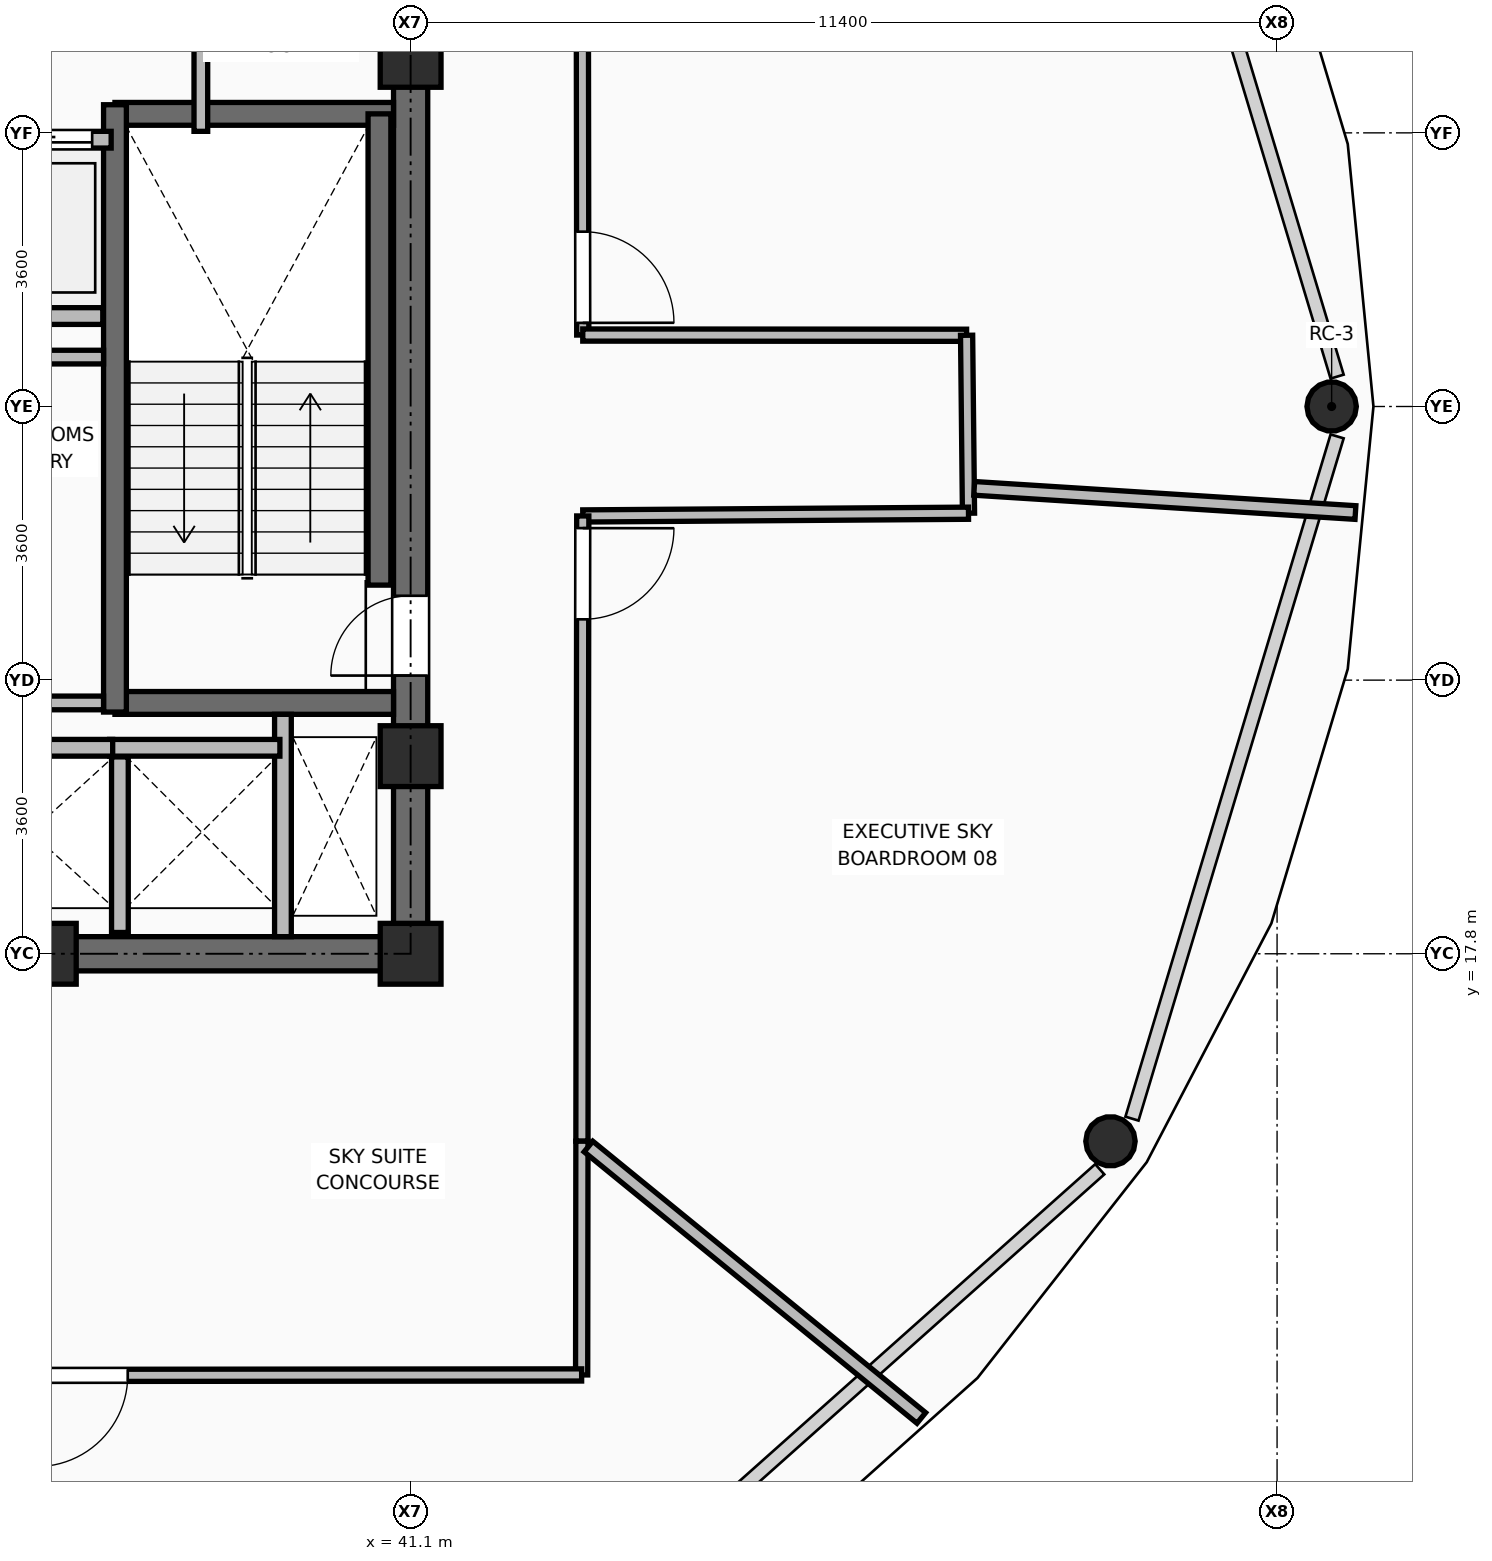
"""IFC4 building model, lengths in metres.
Left out: names, types, materials, properties, quantities, classifications, styles, units other than length and angle.
Written with IfcOpenShell. Run it as: python <this file> out.ifc"""

import sys

from ifc_helpers import new_model, si_unit, direction, frame, frame_2d, origin, origin_2d, place, context, subcontext, project, spatial, rectangle, hollow_circle, extrude, element, fill, save


model = new_model("IFC4")
c1 = context("Model", 3, precision=1e-05, world=origin(), true_north=direction((0.0, 1.0)))
c2 = subcontext(c1, "Body", "Model", "MODEL_VIEW")
j1 = project(units=[si_unit("LENGTHUNIT", "METRE"), si_unit("PLANEANGLEUNIT", "RADIAN")], contexts=[c1])
p1 = place(None, origin())
s1 = spatial("IfcSite", under=j1, at=p1, CompositionType="ELEMENT")
p2 = place(p1, origin())
s2 = spatial("IfcBuilding", under=s1, at=p2, CompositionType="ELEMENT")
p3 = place(p2, frame((0.0, 0.0, 246.15)))
s3 = spatial("IfcBuildingStorey", under=s2, at=p3, CompositionType="ELEMENT", Elevation=246.15)
for number, where, z_axis, x_axis in (
    (1, (36.3, 17.8, 0.0), (0.0, 0.0, 1.0), (1.0, 0.0, 0.0)),
    (2, (41.1, 17.8, 0.0), (0.0, 0.0, 1.0), (1.0, 0.0, 0.0)),
    (3, (41.1, 20.4, 0.0), (0.0, 0.0, 1.0), (1.0, 0.0, 0.0)),
    (4, (41.1, 29.6, 0.0), (0.0, 0.0, 1.0), (1.0, 0.0, 0.0)),
):
    element("IfcColumn", number, at=place(p3, frame(where, z_axis=z_axis, x_axis=x_axis)), inside=s3, PredefinedType="COLUMN", context=c2, shape_type="SweptSolid", body=[
        extrude(rectangle(XDim=0.8, YDim=0.8, at=origin_2d()), origin(), (0.0, 0.0, 1.0), 3.75),
    ])
for number, where, z_axis, x_axis in (
    (5, (53.218, 25.0, 0.0), (0.0, 0.0, 1.0), (1.0, 0.0, 0.0)),
    (6, (50.308, 15.333, 0.0), (0.0, 0.0, 1.0), (1.0, 0.0, 0.0)),
):
    element("IfcColumn", number, at=place(p3, frame(where, z_axis=z_axis, x_axis=x_axis)), inside=s3, PredefinedType="COLUMN", context=c2, shape_type="SweptSolid", body=[
        extrude(hollow_circle(Radius=0.325, WallThickness=0.03, at=origin_2d()), origin(), (0.0, 0.0, 1.0), 3.57),
    ])
p4 = place(p3, frame((37.275, 18.08, 0.0), z_axis=(0.0, 0.0, 1.0), x_axis=(0.0, 1.0, 0.0)))
e7 = element("IfcWall", 7, at=p4, inside=s3, PredefinedType="PARTITIONING", context=c2, shape_type="SweptSolid", body=[
    extrude(rectangle(XDim=2.31, YDim=0.22, at=frame_2d((1.155, 0.0))), origin(), (0.0, 0.0, 1.0), 3.545),
])
p5 = place(p3, frame((34.91, 26.19, 0.0), z_axis=(0.0, 0.0, 1.0), x_axis=(1.0, 0.0, 0.0)))
e8 = element("IfcWall", 8, at=p5, inside=s3, PredefinedType="PARTITIONING", context=c2, shape_type="SweptSolid", body=[
    extrude(rectangle(XDim=2.14, YDim=0.22, at=frame_2d((1.07, 0.0))), origin(), (0.0, 0.0, 1.0), 3.545),
])
p6 = place(p3, frame((34.95, 17.8, 0.0), z_axis=(0.0, 0.0, 1.0), x_axis=(1.0, 0.0, 0.0)))
e9 = element("IfcWall", 9, at=p6, inside=s3, PredefinedType="SHEAR", context=c2, shape_type="SweptSolid", body=[
    extrude(rectangle(XDim=6.375, YDim=0.45, at=frame_2d((3.188, 0.0))), origin(), (0.0, 0.0, 1.0), 3.57),
])
p7 = place(p3, frame((41.1, 18.025, 0.0), z_axis=(0.0, 0.0, 1.0), x_axis=(0.0, 1.0, 0.0)))
e10 = element("IfcWall", 10, at=p7, inside=s3, PredefinedType="SHEAR", context=c2, shape_type="SweptSolid", body=[
    extrude(rectangle(XDim=14.2, YDim=0.45, at=frame_2d((7.1, 0.0))), origin(), (0.0, 0.0, 1.0), 3.57),
])
p8 = place(p7, frame((3.435, 0.0, 0.0)))
e11 = element("IfcOpeningElement", 11, at=p8, cuts=e10, PredefinedType="OPENING", context=c2, shape_type="SweptSolid", body=[
    extrude(rectangle(XDim=1.05, YDim=2.1, at=frame_2d((0.525, 1.05))), frame((0.0, 0.235, 0.0), z_axis=(0.0, -1.0, 0.0), x_axis=(1.0, 0.0, 0.0)), (0.0, 0.0, 1.0), 0.47),
])
for number, where, z_axis, x_axis in (
    (12, (37.21, 21.1, 0.0), (0.0, 0.0, 1.0), (1.0, 0.0, 0.0)),
    (13, (37.21, 28.85, 0.0), (0.0, 0.0, 1.0), (1.0, 0.0, 0.0)),
):
    element("IfcWall", number, at=place(p3, frame(where, z_axis=z_axis, x_axis=x_axis)), inside=s3, PredefinedType="SHEAR", context=c2, shape_type="SweptSolid", body=[
        extrude(rectangle(XDim=3.665, YDim=0.3, at=frame_2d((1.833, 0.0))), origin(), (0.0, 0.0, 1.0), 3.57),
    ])
p9 = place(p3, frame((37.21, 20.98, 0.0), z_axis=(0.0, 0.0, 1.0), x_axis=(0.0, 1.0, 0.0)))
e14 = element("IfcWall", 14, at=p9, inside=s3, PredefinedType="SHEAR", context=c2, shape_type="SweptSolid", body=[
    extrude(rectangle(XDim=7.99, YDim=0.3, at=frame_2d((3.995, 0.0))), origin(), (0.0, 0.0, 1.0), 3.57),
])
p10 = place(p3, frame((40.69, 22.65, 0.0), z_axis=(0.0, 0.0, 1.0), x_axis=(0.0, 1.0, 0.0)))
e15 = element("IfcWall", 15, at=p10, inside=s3, PredefinedType="SHEAR", context=c2, shape_type="SweptSolid", body=[
    extrude(rectangle(XDim=6.2, YDim=0.3, at=frame_2d((3.1, 0.0))), origin(), (0.0, 0.0, 1.0), 3.57),
])
p11 = place(p3, frame((39.42, 18.025, 0.0), z_axis=(0.0, 0.0, 1.0), x_axis=(0.0, 1.0, 0.0)))
e16 = element("IfcWall", 16, at=p11, inside=s3, PredefinedType="PARTITIONING", context=c2, shape_type="SweptSolid", body=[
    extrude(rectangle(XDim=2.925, YDim=0.22, at=frame_2d((1.462, 0.0))), origin(), (0.0, 0.0, 1.0), 3.55),
])
for number, where, z_axis, x_axis in (
    (17, (37.14, 20.51, 0.0), (0.0, 0.0, 1.0), (1.0, 0.0, 0.0)),
    (18, (34.94, 20.51, 0.0), (0.0, 0.0, 1.0), (1.0, 0.0, 0.0)),
):
    element("IfcWall", number, at=place(p3, frame(where, z_axis=z_axis, x_axis=x_axis)), inside=s3, PredefinedType="PARTITIONING", context=c2, shape_type="SweptSolid", body=[
        extrude(rectangle(XDim=2.24, YDim=0.22, at=frame_2d((1.12, 0.0))), origin(), (0.0, 0.0, 1.0), 3.55),
    ])
p12 = place(p3, frame((35.56, 28.51, 0.0), z_axis=(0.0, 0.0, 1.0), x_axis=(1.0, 0.0, 0.0)))
e19 = element("IfcWall", 19, at=p12, inside=s3, PredefinedType="PARTITIONING", context=c2, shape_type="SweptSolid", body=[
    extrude(rectangle(XDim=1.6, YDim=0.22, at=frame_2d((0.8, 0.0))), origin(), (0.0, 0.0, 1.0), 3.55),
])
p13 = place(p12, frame((0.25, 0.0, 0.0)))
e20 = element("IfcOpeningElement", 20, at=p13, cuts=e19, PredefinedType="OPENING", context=c2, shape_type="SweptSolid", body=[
    extrude(rectangle(XDim=1.1, YDim=2.2, at=frame_2d((0.55, 1.1))), frame((0.0, 0.12, 0.0), z_axis=(0.0, -1.0, 0.0), x_axis=(1.0, 0.0, 0.0)), (0.0, 0.0, 1.0), 0.24),
])
p14 = place(p3, frame((34.98, 21.1, 0.0), z_axis=(0.0, 0.0, 1.0), x_axis=(1.0, 0.0, 0.0)))
e21 = element("IfcWall", 21, at=p14, inside=s3, PredefinedType="PARTITIONING", context=c2, shape_type="SweptSolid", body=[
    extrude(rectangle(XDim=2.08, YDim=0.18, at=frame_2d((1.04, 0.0))), origin(), (0.0, 0.0, 1.0), 3.55),
])
p15 = place(p3, frame((34.72, 25.65, 0.0), z_axis=(0.0, 0.0, 1.0), x_axis=(1.0, 0.0, 0.0)))
e22 = element("IfcWall", 22, at=p15, inside=s3, PredefinedType="PARTITIONING", context=c2, shape_type="SweptSolid", body=[
    extrude(rectangle(XDim=2.34, YDim=0.18, at=frame_2d((1.17, 0.0))), origin(), (0.0, 0.0, 1.0), 3.55),
])
p16 = place(p3, frame((38.34, 28.62, 0.0), z_axis=(0.0, 0.0, 1.0), x_axis=(0.0, 1.0, 0.0)))
e23 = element("IfcWall", 23, at=p16, inside=s3, PredefinedType="PARTITIONING", context=c2, shape_type="SweptSolid", body=[
    extrude(rectangle(XDim=3.605, YDim=0.18, at=frame_2d((1.802, 0.0))), origin(), (0.0, 0.0, 1.0), 3.55),
])
p17 = place(p3, frame((43.357, 32.243, 0.0), z_axis=(0.0, 0.0, 1.0), x_axis=(0.00127822648, -0.999999183068, 0.0)))
e24 = element("IfcWall", 24, at=p17, inside=s3, PredefinedType="PARTITIONING", context=c2, shape_type="SweptSolid", body=[
    extrude(rectangle(XDim=6.303, YDim=0.16, at=frame_2d((3.151, 0.0))), origin(), (0.0, 0.0, 1.0), 3.55),
])
p18 = place(p17, frame((4.943, 0.0, 0.0)))
e25 = element("IfcOpeningElement", 25, at=p18, cuts=e24, PredefinedType="OPENING", context=c2, shape_type="SweptSolid", body=[
    extrude(rectangle(XDim=1.2, YDim=2.1, at=frame_2d((0.6, 1.05))), frame((0.0, 0.09, 0.0), z_axis=(0.0, -1.0, 0.0), x_axis=(1.0, 0.0, 0.0)), (0.0, 0.0, 1.0), 0.18),
])
p19 = place(p3, frame((43.365, 25.94, 0.0), z_axis=(0.0, 0.0, 1.0), x_axis=(0.999999831724, -0.000580130432, 0.0)))
e26 = element("IfcWall", 26, at=p19, inside=s3, PredefinedType="PARTITIONING", context=c2, shape_type="SweptSolid", body=[
    extrude(rectangle(XDim=5.05, YDim=0.16, at=frame_2d((2.525, 0.0))), origin(), (0.0, 0.0, 1.0), 3.55),
])
p20 = place(p3, frame((48.415, 25.937, 0.0), z_axis=(0.0, 0.0, 1.0), x_axis=(0.010636586698, -0.999943429912, 0.0)))
e27 = element("IfcWall", 27, at=p20, inside=s3, PredefinedType="PARTITIONING", context=c2, shape_type="SweptSolid", body=[
    extrude(rectangle(XDim=2.341, YDim=0.16, at=frame_2d((1.171, 0.0))), origin(), (0.0, 0.0, 1.0), 3.55),
])
p21 = place(p3, frame((48.44, 23.596, 0.0), z_axis=(0.0, 0.0, 1.0), x_axis=(-0.999974996273, -0.007071550702, 0.0)))
e28 = element("IfcWall", 28, at=p21, inside=s3, PredefinedType="PARTITIONING", context=c2, shape_type="SweptSolid", body=[
    extrude(rectangle(XDim=5.075, YDim=0.16, at=frame_2d((2.538, 0.0))), origin(), (0.0, 0.0, 1.0), 3.55),
])
p22 = place(p3, frame((43.365, 23.56, 0.0), z_axis=(0.0, 0.0, 1.0), x_axis=(-0.001335548165, -0.999999108155, 0.0)))
e29 = element("IfcWall", 29, at=p22, inside=s3, PredefinedType="PARTITIONING", context=c2, shape_type="SweptSolid", body=[
    extrude(rectangle(XDim=8.226, YDim=0.16, at=frame_2d((4.113, 0.0))), origin(), (0.0, 0.0, 1.0), 3.081),
])
p23 = place(p22, frame((0.16, 0.0, 0.0)))
e30 = element("IfcOpeningElement", 30, at=p23, cuts=e29, PredefinedType="OPENING", context=c2, shape_type="SweptSolid", body=[
    extrude(rectangle(XDim=1.2, YDim=2.1, at=frame_2d((0.6, 1.05))), frame((0.0, 0.09, 0.0), z_axis=(0.0, -1.0, 0.0), x_axis=(1.0, 0.0, 0.0)), (0.0, 0.0, 1.0), 0.18),
])
p24 = place(p3, frame((43.354, 15.334, 0.0), z_axis=(0.0, 0.0, 1.0), x_axis=(-0.00127034435, -0.999999193112, 0.0)))
e31 = element("IfcWall", 31, at=p24, inside=s3, PredefinedType="PARTITIONING", context=c2, shape_type="SweptSolid", body=[
    extrude(rectangle(XDim=3.075, YDim=0.16, at=frame_2d((1.538, 0.0))), origin(), (0.0, 0.0, 1.0), 3.55),
])
p25 = place(p3, frame((43.35, 12.259, 0.0), z_axis=(0.0, 0.0, 1.0), x_axis=(-0.999999637579, -0.000851376852, 0.0)))
e32 = element("IfcWall", 32, at=p25, inside=s3, PredefinedType="PARTITIONING", context=c2, shape_type="SweptSolid", body=[
    extrude(rectangle(XDim=10.61, YDim=0.16, at=frame_2d((5.305, 0.0))), origin(), (0.0, 0.0, 1.0), 3.081),
])
p26 = place(p25, frame((5.972, 0.0, 0.0)))
e33 = element("IfcOpeningElement", 33, at=p26, cuts=e32, PredefinedType="OPENING", context=c2, shape_type="SweptSolid", body=[
    extrude(rectangle(XDim=1.2, YDim=2.1, at=frame_2d((0.6, 1.05))), frame((0.0, 0.09, 0.0), z_axis=(0.0, -1.0, 0.0), x_axis=(1.0, 0.0, 0.0)), (0.0, 0.0, 1.0), 0.18),
])
p27 = place(p3, frame((43.44, 15.264, 0.0), z_axis=(0.0, 0.0, 1.0), x_axis=(0.77500924649, -0.631949893469, 0.0)))
e34 = element("IfcWall", 34, at=p27, inside=s3, PredefinedType="PARTITIONING", context=c2, shape_type="SweptSolid", body=[
    extrude(rectangle(XDim=5.65, YDim=0.18, at=frame_2d((2.825, 0.0))), origin(), (0.0, 0.0, 1.0), 2.925),
])
p28 = place(p3, frame((48.515, 23.923, 0.0), z_axis=(0.0, 0.0, 1.0), x_axis=(0.997995081833, -0.063291521057, 0.0)))
e35 = element("IfcWall", 35, at=p28, inside=s3, PredefinedType="PARTITIONING", context=c2, shape_type="SweptSolid", body=[
    extrude(rectangle(XDim=5.026, YDim=0.18, at=frame_2d((2.513, 0.0))), origin(), (0.0, 0.0, 1.0), 2.925),
])
p29 = place(p8, origin())
e36 = element("IfcDoor", 36, at=p29, inside=s3, OperationType="SINGLE_SWING_LEFT", PredefinedType="DOOR", context=c2, shape_type="SweptSolid", body=[
    extrude(rectangle(XDim=1.05, YDim=2.1, at=frame_2d((0.525, 1.05))), frame((0.0, 0.025, 0.0), z_axis=(0.0, -1.0, 0.0), x_axis=(1.0, 0.0, 0.0)), (0.0, 0.0, 1.0), 0.05),
])
fill(e11, e36)
p30 = place(p13, origin())
e37 = element("IfcDoor", 37, at=p30, inside=s3, OperationType="DOUBLE_DOOR_SLIDING", PredefinedType="DOOR", context=c2, shape_type="SweptSolid", body=[
    extrude(rectangle(XDim=1.1, YDim=2.2, at=frame_2d((0.55, 1.1))), frame((0.0, 0.025, 0.0), z_axis=(0.0, -1.0, 0.0), x_axis=(1.0, 0.0, 0.0)), (0.0, 0.0, 1.0), 0.05),
])
fill(e20, e37)
p31 = place(p26, origin())
e38 = element("IfcDoor", 38, at=p31, inside=s3, OperationType="SINGLE_SWING_RIGHT", PredefinedType="DOOR", context=c2, shape_type="SweptSolid", body=[
    extrude(rectangle(XDim=1.2, YDim=2.1, at=frame_2d((0.6, 1.05))), frame((0.0, 0.025, 0.0), z_axis=(0.0, -1.0, 0.0), x_axis=(1.0, 0.0, 0.0)), (0.0, 0.0, 1.0), 0.05),
])
fill(e33, e38)
p32 = place(p23, origin())
e39 = element("IfcDoor", 39, at=p32, inside=s3, OperationType="SINGLE_SWING_LEFT", PredefinedType="DOOR", context=c2, shape_type="SweptSolid", body=[
    extrude(rectangle(XDim=1.2, YDim=2.1, at=frame_2d((0.6, 1.05))), frame((0.0, 0.025, 0.0), z_axis=(0.0, -1.0, 0.0), x_axis=(1.0, 0.0, 0.0)), (0.0, 0.0, 1.0), 0.05),
])
fill(e30, e39)
p33 = place(p18, origin())
e40 = element("IfcDoor", 40, at=p33, inside=s3, OperationType="SINGLE_SWING_RIGHT", PredefinedType="DOOR", context=c2, shape_type="SweptSolid", body=[
    extrude(rectangle(XDim=1.2, YDim=2.1, at=frame_2d((0.6, 1.05))), frame((0.0, 0.025, 0.0), z_axis=(0.0, -1.0, 0.0), x_axis=(1.0, 0.0, 0.0)), (0.0, 0.0, 1.0), 0.05),
])
fill(e25, e40)
save(model, sys.argv[1])
